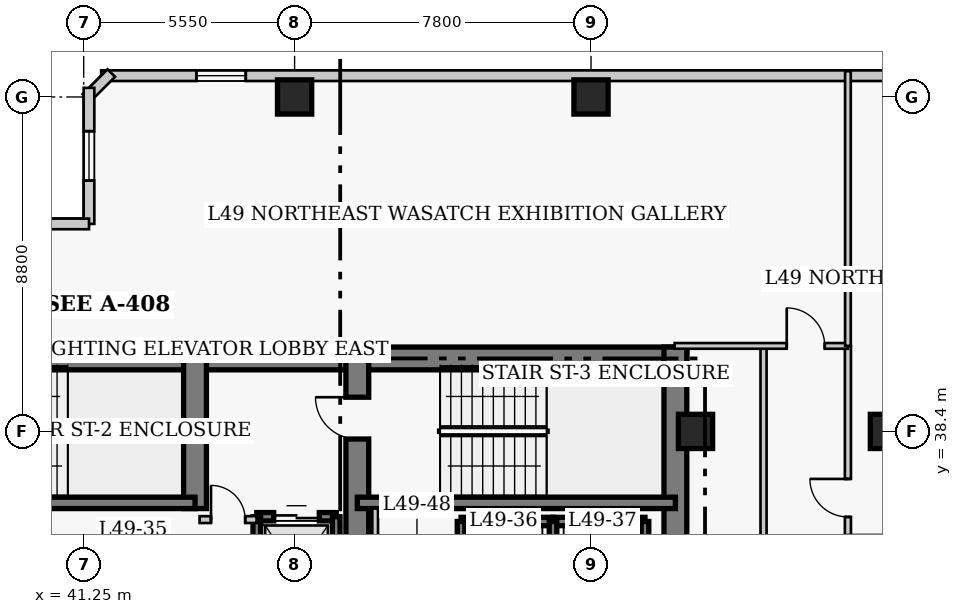
"""IFC4 building model, lengths in metres.
Left out: names, types, materials, properties, quantities, classifications, styles, units other than length and angle.
Written with IfcOpenShell. Run it as: python <this file> out.ifc"""

import sys

from ifc_helpers import new_model, si_unit, direction, frame, frame_2d, origin, origin_2d, place, context, subcontext, project, spatial, rectangle, extrude, element, fill, save


model = new_model("IFC4")
c1 = context("Model", 3, precision=1e-05, world=origin(), true_north=direction((0.0, 1.0)))
c2 = subcontext(c1, "Body", "Model", "MODEL_VIEW")
j1 = project(units=[si_unit("LENGTHUNIT", "METRE"), si_unit("PLANEANGLEUNIT", "RADIAN")], contexts=[c1])
p1 = place(None, origin())
s1 = spatial("IfcSite", under=j1, at=p1, CompositionType="ELEMENT")
p2 = place(p1, origin())
s2 = spatial("IfcBuilding", under=s1, at=p2, CompositionType="ELEMENT")
p3 = place(p2, frame((0.0, 0.0, 196.8)))
s3 = spatial("IfcBuildingStorey", under=s2, at=p3, CompositionType="ELEMENT", Elevation=196.8)
p4 = place(p3, frame((35.85, 40.32, 0.0), z_axis=(0.0, 0.0, 1.0), x_axis=(1.0, 0.0, 0.0)))
e1 = element("IfcWall", 1, at=p4, inside=s3, PredefinedType="SHEAR", context=c2, shape_type="SweptSolid", body=[
    extrude(rectangle(XDim=12.6, YDim=0.6, at=frame_2d((6.3, 0.0))), origin(), (0.0, 0.0, 1.0), 3.9),
])
p5 = place(p3, frame((48.45, 40.32, 0.0), z_axis=(0.0, 0.0, 1.0), x_axis=(1.0, 0.0, 0.0)))
e2 = element("IfcWall", 2, at=p5, inside=s3, PredefinedType="SHEAR", context=c2, shape_type="SweptSolid", body=[
    extrude(rectangle(XDim=8.67, YDim=0.6, at=frame_2d((4.335, 0.0))), origin(), (0.0, 0.0, 1.0), 3.9),
])
p6 = place(p3, frame((56.82, 27.05, 0.0), z_axis=(0.0, 0.0, 1.0), x_axis=(0.0, 1.0, 0.0)))
e3 = element("IfcWall", 3, at=p6, inside=s3, PredefinedType="SHEAR", context=c2, shape_type="SweptSolid", body=[
    extrude(rectangle(XDim=13.57, YDim=0.6, at=frame_2d((6.785, 0.0))), origin(), (0.0, 0.0, 1.0), 3.9),
])
p7 = place(p3, frame((44.18, 36.37, 0.0), z_axis=(0.0, 0.0, 1.0), x_axis=(0.0, 1.0, 0.0)))
e4 = element("IfcWall", 4, at=p7, inside=s3, PredefinedType="SHEAR", context=c2, shape_type="SweptSolid", body=[
    extrude(rectangle(XDim=3.95, YDim=0.6, at=frame_2d((1.975, 0.0))), origin(), (0.0, 0.0, 1.0), 3.9),
])
p8 = place(p3, frame((48.45, 32.45, 0.0), z_axis=(0.0, 0.0, 1.0), x_axis=(0.0, 1.0, 0.0)))
e5 = element("IfcWall", 5, at=p8, inside=s3, PredefinedType="SHEAR", context=c2, shape_type="SweptSolid", body=[
    extrude(rectangle(XDim=7.87, YDim=0.6, at=frame_2d((3.935, 0.0))), origin(), (0.0, 0.0, 1.0), 3.9),
])
p9 = place(p8, frame((5.75, 0.0, 0.0)))
e6 = element("IfcOpeningElement", 6, at=p9, cuts=e5, PredefinedType="OPENING", context=c2, shape_type="SweptSolid", body=[
    extrude(rectangle(XDim=1.1, YDim=2.15, at=frame_2d((0.55, 1.075))), frame((0.0, 0.31, 0.0), z_axis=(0.0, -1.0, 0.0), x_axis=(1.0, 0.0, 0.0)), (0.0, 0.0, 1.0), 0.62),
])
p10 = place(p3, frame((35.85, 36.52, 0.0), z_axis=(0.0, 0.0, 1.0), x_axis=(1.0, 0.0, 0.0)))
e7 = element("IfcWall", 7, at=p10, inside=s3, PredefinedType="SHEAR", context=c2, shape_type="SweptSolid", body=[
    extrude(rectangle(XDim=8.33, YDim=0.3, at=frame_2d((4.165, 0.0))), origin(), (0.0, 0.0, 1.0), 3.9),
])
p11 = place(p3, frame((48.45, 36.52, 0.0), z_axis=(0.0, 0.0, 1.0), x_axis=(1.0, 0.0, 0.0)))
e8 = element("IfcWall", 8, at=p11, inside=s3, PredefinedType="SHEAR", context=c2, shape_type="SweptSolid", body=[
    extrude(rectangle(XDim=8.37, YDim=0.3, at=frame_2d((4.185, 0.0))), origin(), (0.0, 0.0, 1.0), 3.9),
])
for number, where, z_axis, x_axis in (
    (9, (46.8, 47.2, 0.0), (0.0, 0.0, 1.0), (1.0, 0.0, 0.0)),
    (10, (54.6, 47.2, 0.0), (0.0, 0.0, 1.0), (1.0, 0.0, 0.0)),
    (11, (62.4, 38.4, 0.0), (0.0, 0.0, 1.0), (1.0, 0.0, 0.0)),
    (12, (57.35, 38.4, 0.0), (0.0, 0.0, 1.0), (1.0, 0.0, 0.0)),
):
    element("IfcColumn", number, at=place(p3, frame(where, z_axis=z_axis, x_axis=x_axis)), inside=s3, PredefinedType="COLUMN", context=c2, shape_type="SweptSolid", body=[
        extrude(rectangle(XDim=0.9, YDim=0.9, at=origin_2d()), origin(), (0.0, 0.0, 1.0), 3.9),
    ])
p12 = place(p3, frame((67.54, 47.76, 0.0), z_axis=(0.0, 0.0, 1.0), x_axis=(-1.0, 0.0, 0.0)))
e13 = element("IfcWall", 13, at=p12, inside=s3, PredefinedType="SOLIDWALL", context=c2, shape_type="SweptSolid", body=[
    extrude(rectangle(XDim=25.83, YDim=0.28, at=frame_2d((12.915, 0.0))), origin(), (0.0, 0.0, 1.0), 3.65),
])
p13 = place(p12, frame((3.655, 0.0, 0.85)))
e14 = element("IfcOpeningElement", 14, at=p13, cuts=e13, PredefinedType="OPENING", context=c2, shape_type="SweptSolid", body=[
    extrude(rectangle(XDim=1.3, YDim=1.7, at=frame_2d((0.65, 0.85))), frame((0.0, 0.15, 0.0), z_axis=(0.0, -1.0, 0.0), x_axis=(1.0, 0.0, 0.0)), (0.0, 0.0, 1.0), 0.3),
])
p14 = place(p12, frame((22.025, 0.0, 0.85)))
e15 = element("IfcOpeningElement", 15, at=p14, cuts=e13, PredefinedType="OPENING", context=c2, shape_type="SweptSolid", body=[
    extrude(rectangle(XDim=1.3, YDim=1.7, at=frame_2d((0.65, 0.85))), frame((0.0, 0.15, 0.0), z_axis=(0.0, -1.0, 0.0), x_axis=(1.0, 0.0, 0.0)), (0.0, 0.0, 1.0), 0.3),
])
p15 = place(p3, frame((41.977, 47.829, 0.0), z_axis=(0.0, 0.0, 1.0), x_axis=(-0.706975312048, -0.707238225886, 0.0)))
e16 = element("IfcWall", 16, at=p15, inside=s3, PredefinedType="SOLIDWALL", context=c2, shape_type="SweptSolid", body=[
    extrude(rectangle(XDim=0.929, YDim=0.28, at=frame_2d((0.464, 0.0))), origin(), (0.0, 0.0, 1.0), 3.65),
])
p16 = place(p3, frame((41.39, 47.44, 0.0), z_axis=(0.0, 0.0, 1.0), x_axis=(0.0, -1.0, 0.0)))
e17 = element("IfcWall", 17, at=p16, inside=s3, PredefinedType="SOLIDWALL", context=c2, shape_type="SweptSolid", body=[
    extrude(rectangle(XDim=3.58, YDim=0.28, at=frame_2d((1.79, 0.0))), origin(), (0.0, 0.0, 1.0), 3.65),
])
p17 = place(p16, frame((1.14, 0.0, 0.85)))
e18 = element("IfcOpeningElement", 18, at=p17, cuts=e17, PredefinedType="OPENING", context=c2, shape_type="SweptSolid", body=[
    extrude(rectangle(XDim=1.3, YDim=1.7, at=frame_2d((0.65, 0.85))), frame((0.0, 0.15, 0.0), z_axis=(0.0, -1.0, 0.0), x_axis=(1.0, 0.0, 0.0)), (0.0, 0.0, 1.0), 0.3),
])
p18 = place(p3, frame((41.39, 43.86, 0.0), z_axis=(0.0, 0.0, 1.0), x_axis=(-1.0, 0.0, 0.0)))
e19 = element("IfcWall", 19, at=p18, inside=s3, PredefinedType="SOLIDWALL", context=c2, shape_type="SweptSolid", body=[
    extrude(rectangle(XDim=4.78, YDim=0.28, at=frame_2d((2.39, 0.0))), origin(), (0.0, 0.0, 1.0), 3.65),
])
p19 = place(p18, frame((1.74, 0.0, 0.85)))
e20 = element("IfcOpeningElement", 20, at=p19, cuts=e19, PredefinedType="OPENING", context=c2, shape_type="SweptSolid", body=[
    extrude(rectangle(XDim=1.3, YDim=1.7, at=frame_2d((0.65, 0.85))), frame((0.0, 0.15, 0.0), z_axis=(0.0, -1.0, 0.0), x_axis=(1.0, 0.0, 0.0)), (0.0, 0.0, 1.0), 0.3),
])
p20 = place(p3, frame((51.18, 36.03, 0.0), z_axis=(0.0, 0.0, 1.0), x_axis=(1.0, 0.0, 0.0)))
e21 = element("IfcWall", 21, at=p20, inside=s3, PredefinedType="SHEAR", context=c2, shape_type="SweptSolid", body=[
    extrude(rectangle(XDim=2.42, YDim=0.22, at=frame_2d((1.21, 0.0))), origin(), (0.0, 0.0, 1.0), 3.9),
])
p21 = place(p3, frame((51.18, 33.17, 0.0), z_axis=(0.0, 0.0, 1.0), x_axis=(0.0, 1.0, 0.0)))
e22 = element("IfcWall", 22, at=p21, inside=s3, PredefinedType="SHEAR", context=c2, shape_type="SweptSolid", body=[
    extrude(rectangle(XDim=2.86, YDim=0.2, at=frame_2d((1.43, 0.0))), origin(), (0.0, 0.0, 1.0), 3.9),
])
p22 = place(p3, frame((53.6, 36.03, 0.0), z_axis=(0.0, 0.0, 1.0), x_axis=(1.0, 0.0, 0.0)))
e23 = element("IfcWall", 23, at=p22, inside=s3, PredefinedType="SHEAR", context=c2, shape_type="SweptSolid", body=[
    extrude(rectangle(XDim=2.42, YDim=0.22, at=frame_2d((1.21, 0.0))), origin(), (0.0, 0.0, 1.0), 3.9),
])
for number, where, z_axis, x_axis in (
    (24, (53.6, 33.17, 0.0), (0.0, 0.0, 1.0), (0.0, 1.0, 0.0)),
    (25, (56.02, 33.17, 0.0), (0.0, 0.0, 1.0), (0.0, 1.0, 0.0)),
):
    element("IfcWall", number, at=place(p3, frame(where, z_axis=z_axis, x_axis=x_axis)), inside=s3, PredefinedType="SHEAR", context=c2, shape_type="SweptSolid", body=[
        extrude(rectangle(XDim=2.86, YDim=0.2, at=frame_2d((1.43, 0.0))), origin(), (0.0, 0.0, 1.0), 3.9),
    ])
p23 = place(p3, frame((45.805, 36.155, 0.0), z_axis=(0.0, 0.0, 1.0), x_axis=(1.0, 0.0, 0.0)))
e26 = element("IfcWall", 26, at=p23, inside=s3, PredefinedType="SHEAR", context=c2, shape_type="SweptSolid", body=[
    extrude(rectangle(XDim=2.09, YDim=0.22, at=frame_2d((1.045, 0.0))), origin(), (0.0, 0.0, 1.0), 3.9),
])
p24 = place(p23, frame((0.445, 0.0, 0.0)))
e27 = element("IfcOpeningElement", 27, at=p24, cuts=e26, PredefinedType="OPENING", context=c2, shape_type="SweptSolid", body=[
    extrude(rectangle(XDim=1.2, YDim=2.15, at=frame_2d((0.6, 1.075))), frame((0.0, 0.12, 0.0), z_axis=(0.0, -1.0, 0.0), x_axis=(1.0, 0.0, 0.0)), (0.0, 0.0, 1.0), 0.24),
])
p25 = place(p3, frame((45.805, 32.65, 0.0), z_axis=(0.0, 0.0, 1.0), x_axis=(0.0, 1.0, 0.0)))
e28 = element("IfcWall", 28, at=p25, inside=s3, PredefinedType="SHEAR", context=c2, shape_type="SweptSolid", body=[
    extrude(rectangle(XDim=3.505, YDim=0.2, at=frame_2d((1.752, 0.0))), origin(), (0.0, 0.0, 1.0), 3.9),
])
p26 = place(p3, frame((47.895, 33.245, 0.0), z_axis=(0.0, 0.0, 1.0), x_axis=(0.0, 1.0, 0.0)))
e29 = element("IfcWall", 29, at=p26, inside=s3, PredefinedType="SHEAR", context=c2, shape_type="SweptSolid", body=[
    extrude(rectangle(XDim=2.91, YDim=0.2, at=frame_2d((1.455, 0.0))), origin(), (0.0, 0.0, 1.0), 3.9),
])
p27 = place(p3, frame((44.3, 36.08, 0.0), z_axis=(0.0, 0.0, 1.0), x_axis=(1.0, 0.0, 0.0)))
e30 = element("IfcWall", 30, at=p27, inside=s3, PredefinedType="PARTITIONING", context=c2, shape_type="SweptSolid", body=[
    extrude(rectangle(XDim=1.5, YDim=0.18, at=frame_2d((0.75, 0.0))), origin(), (0.0, 0.0, 1.0), 3.65),
])
p28 = place(p27, frame((0.3, 0.0, 0.0)))
e31 = element("IfcOpeningElement", 31, at=p28, cuts=e30, PredefinedType="OPENING", context=c2, shape_type="SweptSolid", body=[
    extrude(rectangle(XDim=0.9, YDim=2.15, at=frame_2d((0.45, 1.075))), frame((0.0, 0.1, 0.0), z_axis=(0.0, -1.0, 0.0), x_axis=(1.0, 0.0, 0.0)), (0.0, 0.0, 1.0), 0.2),
])
p29 = place(p3, frame((48.92, 32.75, 0.0), z_axis=(0.0, 0.0, 1.0), x_axis=(0.0, 1.0, 0.0)))
e32 = element("IfcWall", 32, at=p29, inside=s3, PredefinedType="PARTITIONING", context=c2, shape_type="SweptSolid", body=[
    extrude(rectangle(XDim=3.62, YDim=0.15, at=frame_2d((1.81, 0.0))), origin(), (0.0, 0.0, 1.0), 3.65),
])
p30 = place(p3, frame((61.36, 11.95, 0.0), z_axis=(0.0, 0.0, 1.0), x_axis=(0.0, 1.0, 0.0)))
e33 = element("IfcWall", 33, at=p30, inside=s3, PredefinedType="PARTITIONING", context=c2, shape_type="SweptSolid", body=[
    extrude(rectangle(XDim=28.7, YDim=0.16, at=frame_2d((14.35, 0.0))), origin(), (0.0, 0.0, 1.0), 3.65),
])
p31 = place(p30, frame((3.55, 0.0, 0.0)))
e34 = element("IfcOpeningElement", 34, at=p31, cuts=e33, PredefinedType="OPENING", context=c2, shape_type="SweptSolid", body=[
    extrude(rectangle(XDim=0.95, YDim=2.1, at=frame_2d((0.475, 1.05))), frame((0.0, 0.09, 0.0), z_axis=(0.0, -1.0, 0.0), x_axis=(1.0, 0.0, 0.0)), (0.0, 0.0, 1.0), 0.18),
])
p32 = place(p30, frame((11.975, 0.0, 0.0)))
e35 = element("IfcOpeningElement", 35, at=p32, cuts=e33, PredefinedType="OPENING", context=c2, shape_type="SweptSolid", body=[
    extrude(rectangle(XDim=0.95, YDim=2.1, at=frame_2d((0.475, 1.05))), frame((0.0, 0.09, 0.0), z_axis=(0.0, -1.0, 0.0), x_axis=(1.0, 0.0, 0.0)), (0.0, 0.0, 1.0), 0.18),
])
p33 = place(p30, frame((19.775, 0.0, 0.0)))
e36 = element("IfcOpeningElement", 36, at=p33, cuts=e33, PredefinedType="OPENING", context=c2, shape_type="SweptSolid", body=[
    extrude(rectangle(XDim=0.95, YDim=2.1, at=frame_2d((0.475, 1.05))), frame((0.0, 0.09, 0.0), z_axis=(0.0, -1.0, 0.0), x_axis=(1.0, 0.0, 0.0)), (0.0, 0.0, 1.0), 0.18),
])
p34 = place(p30, frame((24.2, 0.0, 0.0)))
e37 = element("IfcOpeningElement", 37, at=p34, cuts=e33, PredefinedType="OPENING", context=c2, shape_type="SweptSolid", body=[
    extrude(rectangle(XDim=1.0, YDim=2.15, at=frame_2d((0.5, 1.075))), frame((0.0, 0.09, 0.0), z_axis=(0.0, -1.0, 0.0), x_axis=(1.0, 0.0, 0.0)), (0.0, 0.0, 1.0), 0.18),
])
p35 = place(p3, frame((59.14, 17.26, 0.0), z_axis=(0.0, 0.0, 1.0), x_axis=(0.0, 1.0, 0.0)))
e38 = element("IfcWall", 38, at=p35, inside=s3, PredefinedType="PARTITIONING", context=c2, shape_type="SweptSolid", body=[
    extrude(rectangle(XDim=23.39, YDim=0.16, at=frame_2d((11.695, 0.0))), origin(), (0.0, 0.0, 1.0), 3.65),
])
p36 = place(p3, frame((56.8, 40.65, 0.0), z_axis=(0.0, 0.0, 1.0), x_axis=(1.0, 0.0, 0.0)))
e39 = element("IfcWall", 39, at=p36, inside=s3, PredefinedType="PARTITIONING", context=c2, shape_type="SweptSolid", body=[
    extrude(rectangle(XDim=4.56, YDim=0.15, at=frame_2d((2.28, 0.0))), origin(), (0.0, 0.0, 1.0), 3.65),
])
p37 = place(p36, frame((2.95, 0.0, 0.0)))
e40 = element("IfcOpeningElement", 40, at=p37, cuts=e39, PredefinedType="OPENING", context=c2, shape_type="SweptSolid", body=[
    extrude(rectangle(XDim=1.0, YDim=2.15, at=frame_2d((0.5, 1.075))), frame((0.0, 0.085, 0.0), z_axis=(0.0, -1.0, 0.0), x_axis=(1.0, 0.0, 0.0)), (0.0, 0.0, 1.0), 0.17),
])
p38 = place(p3, frame((61.36, 40.65, 0.0), z_axis=(0.0, 0.0, 1.0), x_axis=(0.0, 1.0, 0.0)))
e41 = element("IfcWall", 41, at=p38, inside=s3, PredefinedType="PARTITIONING", context=c2, shape_type="SweptSolid", body=[
    extrude(rectangle(XDim=7.23, YDim=0.15, at=frame_2d((3.615, 0.0))), origin(), (0.0, 0.0, 1.0), 3.65),
])
p39 = place(p14, origin())
e42 = element("IfcWindow", 42, at=p39, inside=s3, PartitioningType="SINGLE_PANEL", PredefinedType="WINDOW", context=c2, shape_type="SweptSolid", body=[
    extrude(rectangle(XDim=1.3, YDim=1.7, at=frame_2d((0.65, 0.85))), frame((0.0, 0.03, 0.0), z_axis=(0.0, -1.0, 0.0), x_axis=(1.0, 0.0, 0.0)), (0.0, 0.0, 1.0), 0.06),
])
fill(e15, e42)
p40 = place(p17, origin())
e43 = element("IfcWindow", 43, at=p40, inside=s3, PartitioningType="SINGLE_PANEL", PredefinedType="WINDOW", context=c2, shape_type="SweptSolid", body=[
    extrude(rectangle(XDim=1.3, YDim=1.7, at=frame_2d((0.65, 0.85))), frame((0.0, 0.03, 0.0), z_axis=(0.0, -1.0, 0.0), x_axis=(1.0, 0.0, 0.0)), (0.0, 0.0, 1.0), 0.06),
])
fill(e18, e43)
p41 = place(p24, origin())
e44 = element("IfcDoor", 44, at=p41, inside=s3, OperationType="DOUBLE_DOOR_SLIDING", PredefinedType="DOOR", context=c2, shape_type="SweptSolid", body=[
    extrude(rectangle(XDim=1.2, YDim=2.15, at=frame_2d((0.6, 1.075))), frame((0.0, 0.025, 0.0), z_axis=(0.0, -1.0, 0.0), x_axis=(1.0, 0.0, 0.0)), (0.0, 0.0, 1.0), 0.05),
])
fill(e27, e44)
p42 = place(p28, origin())
e45 = element("IfcDoor", 45, at=p42, inside=s3, OperationType="SINGLE_SWING_LEFT", PredefinedType="DOOR", context=c2, shape_type="SweptSolid", body=[
    extrude(rectangle(XDim=0.9, YDim=2.15, at=frame_2d((0.45, 1.075))), frame((0.0, 0.025, 0.0), z_axis=(0.0, -1.0, 0.0), x_axis=(1.0, 0.0, 0.0)), (0.0, 0.0, 1.0), 0.05),
])
fill(e31, e45)
p43 = place(p37, origin())
e46 = element("IfcDoor", 46, at=p43, inside=s3, OperationType="SINGLE_SWING_LEFT", PredefinedType="DOOR", context=c2, shape_type="SweptSolid", body=[
    extrude(rectangle(XDim=1.0, YDim=2.15, at=frame_2d((0.5, 1.075))), frame((0.0, 0.025, 0.0), z_axis=(0.0, -1.0, 0.0), x_axis=(1.0, 0.0, 0.0)), (0.0, 0.0, 1.0), 0.05),
])
fill(e40, e46)
p44 = place(p34, origin())
e47 = element("IfcDoor", 47, at=p44, inside=s3, OperationType="SINGLE_SWING_RIGHT", PredefinedType="DOOR", context=c2, shape_type="SweptSolid", body=[
    extrude(rectangle(XDim=1.0, YDim=2.15, at=frame_2d((0.5, 1.075))), frame((0.0, 0.025, 0.0), z_axis=(0.0, -1.0, 0.0), x_axis=(1.0, 0.0, 0.0)), (0.0, 0.0, 1.0), 0.05),
])
fill(e37, e47)
p45 = place(p9, origin())
e48 = element("IfcDoor", 48, at=p45, inside=s3, OperationType="SINGLE_SWING_RIGHT", PredefinedType="DOOR", context=c2, shape_type="SweptSolid", body=[
    extrude(rectangle(XDim=1.1, YDim=2.15, at=frame_2d((0.55, 1.075))), frame((0.0, 0.025, 0.0), z_axis=(0.0, -1.0, 0.0), x_axis=(1.0, 0.0, 0.0)), (0.0, 0.0, 1.0), 0.05),
])
fill(e6, e48)
save(model, sys.argv[1])
